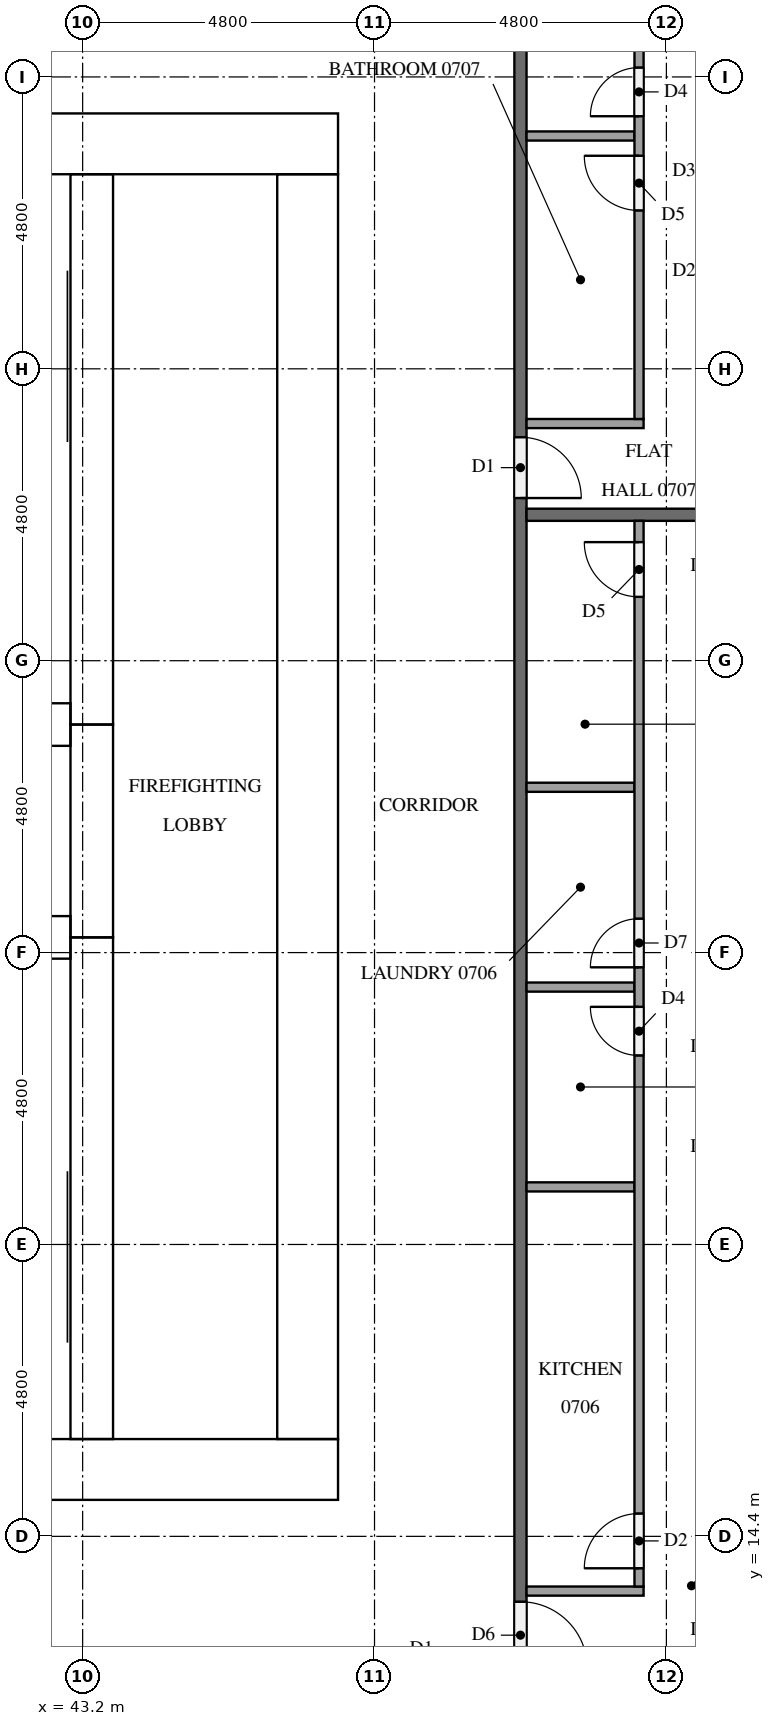
"""IFC4 building model, lengths in metres.
Left out: names, types, materials, properties, quantities, classifications, styles, units other than length and angle.
Written with IfcOpenShell. Run it as: python <this file> out.ifc"""

import sys

from ifc_helpers import new_model, si_unit, direction, frame, frame_2d, origin, place, context, subcontext, project, spatial, rectangle, extrude, element, fill, save


model = new_model("IFC4")
c1 = context("Model", 3, precision=1e-05, world=origin(), true_north=direction((0.0, 1.0)))
c2 = subcontext(c1, "Body", "Model", "MODEL_VIEW")
j1 = project(units=[si_unit("LENGTHUNIT", "METRE"), si_unit("PLANEANGLEUNIT", "RADIAN")], contexts=[c1])
p1 = place(None, origin())
s1 = spatial("IfcSite", under=j1, at=p1, CompositionType="ELEMENT")
p2 = place(p1, origin())
s2 = spatial("IfcBuilding", under=s1, at=p2, CompositionType="ELEMENT")
p3 = place(p2, frame((0.0, 0.0, 32.9)))
s3 = spatial("IfcBuildingStorey", under=s2, at=p3, CompositionType="ELEMENT", Elevation=32.9)
p4 = place(p3, frame((15.0, 15.5, 0.0), z_axis=(0.0, 0.0, 1.0), x_axis=(1.0, 0.0, 0.0)))
e1 = element("IfcWall", 1, at=p4, inside=s3, PredefinedType="SHEAR", context=c2, shape_type="SweptSolid", body=[
    extrude(rectangle(XDim=32.4, YDim=1.0, at=frame_2d((16.2, 0.0))), origin(), (0.0, 0.0, 1.0), 3.2),
])
p5 = place(p4, frame((15.3, 0.0, 0.0)))
e2 = element("IfcOpeningElement", 2, at=p5, cuts=e1, PredefinedType="OPENING", context=c2, shape_type="SweptSolid", body=[
    extrude(rectangle(XDim=1.8, YDim=2.1, at=frame_2d((0.9, 1.05))), frame((0.0, 0.51, 0.0), z_axis=(0.0, -1.0, 0.0), x_axis=(1.0, 0.0, 0.0)), (0.0, 0.0, 1.0), 1.02),
])
p6 = place(p3, frame((15.0, 37.3, 0.0), z_axis=(0.0, 0.0, 1.0), x_axis=(1.0, 0.0, 0.0)))
e3 = element("IfcWall", 3, at=p6, inside=s3, PredefinedType="SHEAR", context=c2, shape_type="SweptSolid", body=[
    extrude(rectangle(XDim=32.4, YDim=1.0, at=frame_2d((16.2, 0.0))), origin(), (0.0, 0.0, 1.0), 3.2),
])
p7 = place(p6, frame((15.3, 0.0, 0.0)))
e4 = element("IfcOpeningElement", 4, at=p7, cuts=e3, PredefinedType="OPENING", context=c2, shape_type="SweptSolid", body=[
    extrude(rectangle(XDim=1.8, YDim=2.1, at=frame_2d((0.9, 1.05))), frame((0.0, 0.51, 0.0), z_axis=(0.0, -1.0, 0.0), x_axis=(1.0, 0.0, 0.0)), (0.0, 0.0, 1.0), 1.02),
])
p8 = place(p6, frame((1.766, 0.0, 0.0)))
e5 = element("IfcOpeningElement", 5, at=p8, cuts=e3, PredefinedType="OPENING", context=c2, shape_type="SweptSolid", body=[
    extrude(rectangle(XDim=1.0, YDim=2.1, at=frame_2d((0.5, 1.05))), frame((0.0, 0.51, 0.0), z_axis=(0.0, -1.0, 0.0), x_axis=(1.0, 0.0, 0.0)), (0.0, 0.0, 1.0), 1.02),
])
p9 = place(p6, frame((5.241, 0.0, 0.0)))
e6 = element("IfcOpeningElement", 6, at=p9, cuts=e3, PredefinedType="OPENING", context=c2, shape_type="SweptSolid", body=[
    extrude(rectangle(XDim=1.0, YDim=2.1, at=frame_2d((0.5, 1.05))), frame((0.0, 0.51, 0.0), z_axis=(0.0, -1.0, 0.0), x_axis=(1.0, 0.0, 0.0)), (0.0, 0.0, 1.0), 1.02),
])
p10 = place(p3, frame((46.9, 16.0, 0.0), z_axis=(0.0, 0.0, 1.0), x_axis=(0.0, 1.0, 0.0)))
e7 = element("IfcWall", 7, at=p10, inside=s3, PredefinedType="SHEAR", context=c2, shape_type="SweptSolid", body=[
    extrude(rectangle(XDim=20.8, YDim=1.0, at=frame_2d((10.4, 0.0))), origin(), (0.0, 0.0, 1.0), 3.2),
])
p11 = place(p10, frame((10.1, 0.0, 0.0)))
e8 = element("IfcOpeningElement", 8, at=p11, cuts=e7, PredefinedType="OPENING", context=c2, shape_type="SweptSolid", body=[
    extrude(rectangle(XDim=1.2, YDim=2.1, at=frame_2d((0.6, 1.05))), frame((0.0, 0.51, 0.0), z_axis=(0.0, -1.0, 0.0), x_axis=(1.0, 0.0, 0.0)), (0.0, 0.0, 1.0), 1.02),
])
p12 = place(p3, frame((43.35, 16.0, 0.0), z_axis=(0.0, 0.0, 1.0), x_axis=(0.0, 1.0, 0.0)))
e9 = element("IfcWall", 9, at=p12, inside=s3, PredefinedType="SHEAR", context=c2, shape_type="SweptSolid", body=[
    extrude(rectangle(XDim=8.25, YDim=0.7, at=frame_2d((4.125, 0.0))), origin(), (0.0, 0.0, 1.0), 3.2),
])
p13 = place(p12, frame((0.2, 0.0, 0.0)))
e10 = element("IfcOpeningElement", 10, at=p13, cuts=e9, PredefinedType="OPENING", context=c2, shape_type="SweptSolid", body=[
    extrude(rectangle(XDim=1.2, YDim=2.1, at=frame_2d((0.6, 1.05))), frame((0.0, 0.36, 0.0), z_axis=(0.0, -1.0, 0.0), x_axis=(1.0, 0.0, 0.0)), (0.0, 0.0, 1.0), 0.72),
])
p14 = place(p3, frame((43.35, 24.25, 0.0), z_axis=(0.0, 0.0, 1.0), x_axis=(0.0, 1.0, 0.0)))
e11 = element("IfcWall", 11, at=p14, inside=s3, PredefinedType="SHEAR", context=c2, shape_type="SweptSolid", body=[
    extrude(rectangle(XDim=3.5, YDim=0.7, at=frame_2d((1.75, 0.0))), origin(), (0.0, 0.0, 1.0), 3.2),
])
p15 = place(p14, frame((1.2, 0.0, 0.0)))
e12 = element("IfcOpeningElement", 12, at=p15, cuts=e11, PredefinedType="OPENING", context=c2, shape_type="SweptSolid", body=[
    extrude(rectangle(XDim=1.1, YDim=2.1, at=frame_2d((0.55, 1.05))), frame((0.0, 0.36, 0.0), z_axis=(0.0, -1.0, 0.0), x_axis=(1.0, 0.0, 0.0)), (0.0, 0.0, 1.0), 0.72),
])
p16 = place(p3, frame((43.35, 27.75, 0.0), z_axis=(0.0, 0.0, 1.0), x_axis=(0.0, 1.0, 0.0)))
e13 = element("IfcWall", 13, at=p16, inside=s3, PredefinedType="SHEAR", context=c2, shape_type="SweptSolid", body=[
    extrude(rectangle(XDim=9.05, YDim=0.7, at=frame_2d((4.525, 0.0))), origin(), (0.0, 0.0, 1.0), 3.2),
])
p17 = place(p16, frame((7.65, 0.0, 0.0)))
e14 = element("IfcOpeningElement", 14, at=p17, cuts=e13, PredefinedType="OPENING", context=c2, shape_type="SweptSolid", body=[
    extrude(rectangle(XDim=1.2, YDim=2.1, at=frame_2d((0.6, 1.05))), frame((0.0, 0.36, 0.0), z_axis=(0.0, -1.0, 0.0), x_axis=(1.0, 0.0, 0.0)), (0.0, 0.0, 1.0), 0.72),
])
for number, where, z_axis, x_axis in (
    (15, (39.65, 24.25, 0.0), (0.0, 0.0, 1.0), (1.0, 0.0, 0.0)),
    (16, (39.65, 27.75, 0.0), (0.0, 0.0, 1.0), (1.0, 0.0, 0.0)),
):
    element("IfcWall", number, at=place(p3, frame(where, z_axis=z_axis, x_axis=x_axis)), inside=s3, PredefinedType="SHEAR", context=c2, shape_type="SweptSolid", body=[
        extrude(rectangle(XDim=3.35, YDim=0.7, at=frame_2d((1.675, 0.0))), origin(), (0.0, 0.0, 1.0), 3.2),
    ])
p18 = place(p3, frame((50.4, 40.7, 0.0), z_axis=(0.0, 0.0, 1.0), x_axis=(0.0, -1.0, 0.0)))
e17 = element("IfcWall", 17, at=p18, inside=s3, PredefinedType="PARTITIONING", context=c2, shape_type="SweptSolid", body=[
    extrude(rectangle(XDim=28.6, YDim=0.2, at=frame_2d((14.3, 0.0))), origin(), (0.0, 0.0, 1.0), 3.2),
])
p19 = place(p18, frame((27.375, 0.0, 0.0)))
e18 = element("IfcOpeningElement", 18, at=p19, cuts=e17, PredefinedType="OPENING", context=c2, shape_type="SweptSolid", body=[
    extrude(rectangle(XDim=1.1, YDim=2.1, at=frame_2d((0.55, 1.05))), frame((0.0, 0.11, 0.0), z_axis=(0.0, -1.0, 0.0), x_axis=(1.0, 0.0, 0.0)), (0.0, 0.0, 1.0), 0.22),
])
p20 = place(p18, frame((8.225, 0.0, 0.0)))
e19 = element("IfcOpeningElement", 19, at=p20, cuts=e17, PredefinedType="OPENING", context=c2, shape_type="SweptSolid", body=[
    extrude(rectangle(XDim=1.0, YDim=2.1, at=frame_2d((0.5, 1.05))), frame((0.0, 0.11, 0.0), z_axis=(0.0, -1.0, 0.0), x_axis=(1.0, 0.0, 0.0)), (0.0, 0.0, 1.0), 0.22),
])
p21 = place(p3, frame((50.5, 31.2, 0.0), z_axis=(0.0, 0.0, 1.0), x_axis=(1.0, 0.0, 0.0)))
e20 = element("IfcWall", 20, at=p21, inside=s3, PredefinedType="PARTITIONING", context=c2, shape_type="SweptSolid", body=[
    extrude(rectangle(XDim=7.0, YDim=0.2, at=frame_2d((3.5, 0.0))), origin(), (0.0, 0.0, 1.0), 3.2),
])
for number, where, z_axis, x_axis in (
    (21, (50.5, 20.147, 0.0), (0.0, 0.0, 1.0), (1.0, 0.0, 0.0)),
    (22, (50.5, 23.433, 0.0), (0.0, 0.0, 1.0), (1.0, 0.0, 0.0)),
    (23, (50.5, 26.719, 0.0), (0.0, 0.0, 1.0), (1.0, 0.0, 0.0)),
):
    element("IfcWall", number, at=place(p3, frame(where, z_axis=z_axis, x_axis=x_axis)), inside=s3, PredefinedType="PARTITIONING", context=c2, shape_type="SweptSolid", body=[
        extrude(rectangle(XDim=1.775, YDim=0.15, at=frame_2d((0.887, 0.0))), origin(), (0.0, 0.0, 1.0), 3.2),
    ])
p22 = place(p3, frame((50.5, 13.5, 0.0), z_axis=(0.0, 0.0, 1.0), x_axis=(1.0, 0.0, 0.0)))
e24 = element("IfcWall", 24, at=p22, inside=s3, PredefinedType="PARTITIONING", context=c2, shape_type="SweptSolid", body=[
    extrude(rectangle(XDim=1.925, YDim=0.15, at=frame_2d((0.962, 0.0))), origin(), (0.0, 0.0, 1.0), 3.2),
])
p23 = place(p3, frame((52.35, 13.575, 0.0), z_axis=(0.0, 0.0, 1.0), x_axis=(0.0, 1.0, 0.0)))
e25 = element("IfcWall", 25, at=p23, inside=s3, PredefinedType="PARTITIONING", context=c2, shape_type="SweptSolid", body=[
    extrude(rectangle(XDim=17.525, YDim=0.15, at=frame_2d((8.763, 0.0))), origin(), (0.0, 0.0, 1.0), 3.2),
])
p24 = place(p23, frame((0.3, 0.0, 0.0)))
e26 = element("IfcOpeningElement", 26, at=p24, cuts=e25, PredefinedType="OPENING", context=c2, shape_type="SweptSolid", body=[
    extrude(rectangle(XDim=0.9, YDim=2.1, at=frame_2d((0.45, 1.05))), frame((0.0, 0.085, 0.0), z_axis=(0.0, -1.0, 0.0), x_axis=(1.0, 0.0, 0.0)), (0.0, 0.0, 1.0), 0.17),
])
p25 = place(p23, frame((8.733, 0.0, 0.0)))
e27 = element("IfcOpeningElement", 27, at=p25, cuts=e25, PredefinedType="OPENING", context=c2, shape_type="SweptSolid", body=[
    extrude(rectangle(XDim=0.8, YDim=2.1, at=frame_2d((0.4, 1.05))), frame((0.0, 0.085, 0.0), z_axis=(0.0, -1.0, 0.0), x_axis=(1.0, 0.0, 0.0)), (0.0, 0.0, 1.0), 0.17),
])
p26 = place(p23, frame((10.183, 0.0, 0.0)))
e28 = element("IfcOpeningElement", 28, at=p26, cuts=e25, PredefinedType="OPENING", context=c2, shape_type="SweptSolid", body=[
    extrude(rectangle(XDim=0.8, YDim=2.1, at=frame_2d((0.4, 1.05))), frame((0.0, 0.085, 0.0), z_axis=(0.0, -1.0, 0.0), x_axis=(1.0, 0.0, 0.0)), (0.0, 0.0, 1.0), 0.17),
])
p27 = place(p23, frame((16.275, 0.0, 0.0)))
e29 = element("IfcOpeningElement", 29, at=p27, cuts=e25, PredefinedType="OPENING", context=c2, shape_type="SweptSolid", body=[
    extrude(rectangle(XDim=0.9, YDim=2.1, at=frame_2d((0.45, 1.05))), frame((0.0, 0.085, 0.0), z_axis=(0.0, -1.0, 0.0), x_axis=(1.0, 0.0, 0.0)), (0.0, 0.0, 1.0), 0.17),
])
p28 = place(p3, frame((50.5, 37.429, 0.0), z_axis=(0.0, 0.0, 1.0), x_axis=(1.0, 0.0, 0.0)))
e30 = element("IfcWall", 30, at=p28, inside=s3, PredefinedType="PARTITIONING", context=c2, shape_type="SweptSolid", body=[
    extrude(rectangle(XDim=1.775, YDim=0.15, at=frame_2d((0.887, 0.0))), origin(), (0.0, 0.0, 1.0), 3.2),
])
p29 = place(p3, frame((50.5, 32.7, 0.0), z_axis=(0.0, 0.0, 1.0), x_axis=(1.0, 0.0, 0.0)))
e31 = element("IfcWall", 31, at=p29, inside=s3, PredefinedType="PARTITIONING", context=c2, shape_type="SweptSolid", body=[
    extrude(rectangle(XDim=1.925, YDim=0.15, at=frame_2d((0.962, 0.0))), origin(), (0.0, 0.0, 1.0), 3.2),
])
p30 = place(p3, frame((52.35, 32.775, 0.0), z_axis=(0.0, 0.0, 1.0), x_axis=(0.0, 1.0, 0.0)))
e32 = element("IfcWall", 32, at=p30, inside=s3, PredefinedType="PARTITIONING", context=c2, shape_type="SweptSolid", body=[
    extrude(rectangle(XDim=14.6, YDim=0.15, at=frame_2d((7.3, 0.0))), origin(), (0.0, 0.0, 1.0), 3.2),
])
p31 = place(p30, frame((3.429, 0.0, 0.0)))
e33 = element("IfcOpeningElement", 33, at=p31, cuts=e32, PredefinedType="OPENING", context=c2, shape_type="SweptSolid", body=[
    extrude(rectangle(XDim=0.9, YDim=2.1, at=frame_2d((0.45, 1.05))), frame((0.0, 0.085, 0.0), z_axis=(0.0, -1.0, 0.0), x_axis=(1.0, 0.0, 0.0)), (0.0, 0.0, 1.0), 0.17),
])
p32 = place(p30, frame((4.979, 0.0, 0.0)))
e34 = element("IfcOpeningElement", 34, at=p32, cuts=e32, PredefinedType="OPENING", context=c2, shape_type="SweptSolid", body=[
    extrude(rectangle(XDim=0.8, YDim=2.1, at=frame_2d((0.4, 1.05))), frame((0.0, 0.085, 0.0), z_axis=(0.0, -1.0, 0.0), x_axis=(1.0, 0.0, 0.0)), (0.0, 0.0, 1.0), 0.17),
])
p33 = place(p30, frame((13.4, 0.0, 0.0)))
e35 = element("IfcOpeningElement", 35, at=p33, cuts=e32, PredefinedType="OPENING", context=c2, shape_type="SweptSolid", body=[
    extrude(rectangle(XDim=0.9, YDim=2.1, at=frame_2d((0.45, 1.05))), frame((0.0, 0.085, 0.0), z_axis=(0.0, -1.0, 0.0), x_axis=(1.0, 0.0, 0.0)), (0.0, 0.0, 1.0), 0.17),
])
p34 = place(p15, origin())
e36 = element("IfcDoor", 36, at=p34, inside=s3, OperationType="DOUBLE_DOOR_SLIDING", PredefinedType="DOOR", context=c2, shape_type="SweptSolid", body=[
    extrude(rectangle(XDim=1.1, YDim=2.1, at=frame_2d((0.55, 1.05))), frame((0.0, 0.025, 0.0), z_axis=(0.0, -1.0, 0.0), x_axis=(1.0, 0.0, 0.0)), (0.0, 0.0, 1.0), 0.05),
])
fill(e12, e36)
p35 = place(p13, origin())
e37 = element("IfcDoor", 37, at=p35, inside=s3, OperationType="SINGLE_SWING_RIGHT", PredefinedType="DOOR", context=c2, shape_type="SweptSolid", body=[
    extrude(rectangle(XDim=1.2, YDim=2.1, at=frame_2d((0.6, 1.05))), frame((0.0, 0.025, 0.0), z_axis=(0.0, -1.0, 0.0), x_axis=(1.0, 0.0, 0.0)), (0.0, 0.0, 1.0), 0.05),
])
fill(e10, e37)
p36 = place(p17, origin())
e38 = element("IfcDoor", 38, at=p36, inside=s3, OperationType="SINGLE_SWING_LEFT", PredefinedType="DOOR", context=c2, shape_type="SweptSolid", body=[
    extrude(rectangle(XDim=1.2, YDim=2.1, at=frame_2d((0.6, 1.05))), frame((0.0, 0.025, 0.0), z_axis=(0.0, -1.0, 0.0), x_axis=(1.0, 0.0, 0.0)), (0.0, 0.0, 1.0), 0.05),
])
fill(e14, e38)
p37 = place(p11, origin())
e39 = element("IfcDoor", 39, at=p37, inside=s3, OperationType="SINGLE_SWING_LEFT", PredefinedType="DOOR", context=c2, shape_type="SweptSolid", body=[
    extrude(rectangle(XDim=1.2, YDim=2.1, at=frame_2d((0.6, 1.05))), frame((0.0, 0.025, 0.0), z_axis=(0.0, -1.0, 0.0), x_axis=(1.0, 0.0, 0.0)), (0.0, 0.0, 1.0), 0.05),
])
fill(e8, e39)
p38 = place(p19, origin())
e40 = element("IfcDoor", 40, at=p38, inside=s3, OperationType="SINGLE_SWING_RIGHT", PredefinedType="DOOR", context=c2, shape_type="SweptSolid", body=[
    extrude(rectangle(XDim=1.1, YDim=2.1, at=frame_2d((0.55, 1.05))), frame((0.0, 0.025, 0.0), z_axis=(0.0, -1.0, 0.0), x_axis=(1.0, 0.0, 0.0)), (0.0, 0.0, 1.0), 0.05),
])
fill(e18, e40)
p39 = place(p20, origin())
e41 = element("IfcDoor", 41, at=p39, inside=s3, OperationType="SINGLE_SWING_RIGHT", PredefinedType="DOOR", context=c2, shape_type="SweptSolid", body=[
    extrude(rectangle(XDim=1.0, YDim=2.1, at=frame_2d((0.5, 1.05))), frame((0.0, 0.025, 0.0), z_axis=(0.0, -1.0, 0.0), x_axis=(1.0, 0.0, 0.0)), (0.0, 0.0, 1.0), 0.05),
])
fill(e19, e41)
p40 = place(p24, origin())
e42 = element("IfcDoor", 42, at=p40, inside=s3, OperationType="SINGLE_SWING_LEFT", PredefinedType="DOOR", context=c2, shape_type="SweptSolid", body=[
    extrude(rectangle(XDim=0.9, YDim=2.1, at=frame_2d((0.45, 1.05))), frame((0.0, 0.025, 0.0), z_axis=(0.0, -1.0, 0.0), x_axis=(1.0, 0.0, 0.0)), (0.0, 0.0, 1.0), 0.05),
])
fill(e26, e42)
p41 = place(p25, origin())
e43 = element("IfcDoor", 43, at=p41, inside=s3, OperationType="SINGLE_SWING_RIGHT", PredefinedType="DOOR", context=c2, shape_type="SweptSolid", body=[
    extrude(rectangle(XDim=0.8, YDim=2.1, at=frame_2d((0.4, 1.05))), frame((0.0, 0.025, 0.0), z_axis=(0.0, -1.0, 0.0), x_axis=(1.0, 0.0, 0.0)), (0.0, 0.0, 1.0), 0.05),
])
fill(e27, e43)
p42 = place(p26, origin())
e44 = element("IfcDoor", 44, at=p42, inside=s3, OperationType="SINGLE_SWING_LEFT", PredefinedType="DOOR", context=c2, shape_type="SweptSolid", body=[
    extrude(rectangle(XDim=0.8, YDim=2.1, at=frame_2d((0.4, 1.05))), frame((0.0, 0.025, 0.0), z_axis=(0.0, -1.0, 0.0), x_axis=(1.0, 0.0, 0.0)), (0.0, 0.0, 1.0), 0.05),
])
fill(e28, e44)
p43 = place(p27, origin())
e45 = element("IfcDoor", 45, at=p43, inside=s3, OperationType="SINGLE_SWING_RIGHT", PredefinedType="DOOR", context=c2, shape_type="SweptSolid", body=[
    extrude(rectangle(XDim=0.9, YDim=2.1, at=frame_2d((0.45, 1.05))), frame((0.0, 0.025, 0.0), z_axis=(0.0, -1.0, 0.0), x_axis=(1.0, 0.0, 0.0)), (0.0, 0.0, 1.0), 0.05),
])
fill(e29, e45)
p44 = place(p31, origin())
e46 = element("IfcDoor", 46, at=p44, inside=s3, OperationType="SINGLE_SWING_RIGHT", PredefinedType="DOOR", context=c2, shape_type="SweptSolid", body=[
    extrude(rectangle(XDim=0.9, YDim=2.1, at=frame_2d((0.45, 1.05))), frame((0.0, 0.025, 0.0), z_axis=(0.0, -1.0, 0.0), x_axis=(1.0, 0.0, 0.0)), (0.0, 0.0, 1.0), 0.05),
])
fill(e33, e46)
p45 = place(p32, origin())
e47 = element("IfcDoor", 47, at=p45, inside=s3, OperationType="SINGLE_SWING_LEFT", PredefinedType="DOOR", context=c2, shape_type="SweptSolid", body=[
    extrude(rectangle(XDim=0.8, YDim=2.1, at=frame_2d((0.4, 1.05))), frame((0.0, 0.025, 0.0), z_axis=(0.0, -1.0, 0.0), x_axis=(1.0, 0.0, 0.0)), (0.0, 0.0, 1.0), 0.05),
])
fill(e34, e47)
save(model, sys.argv[1])
